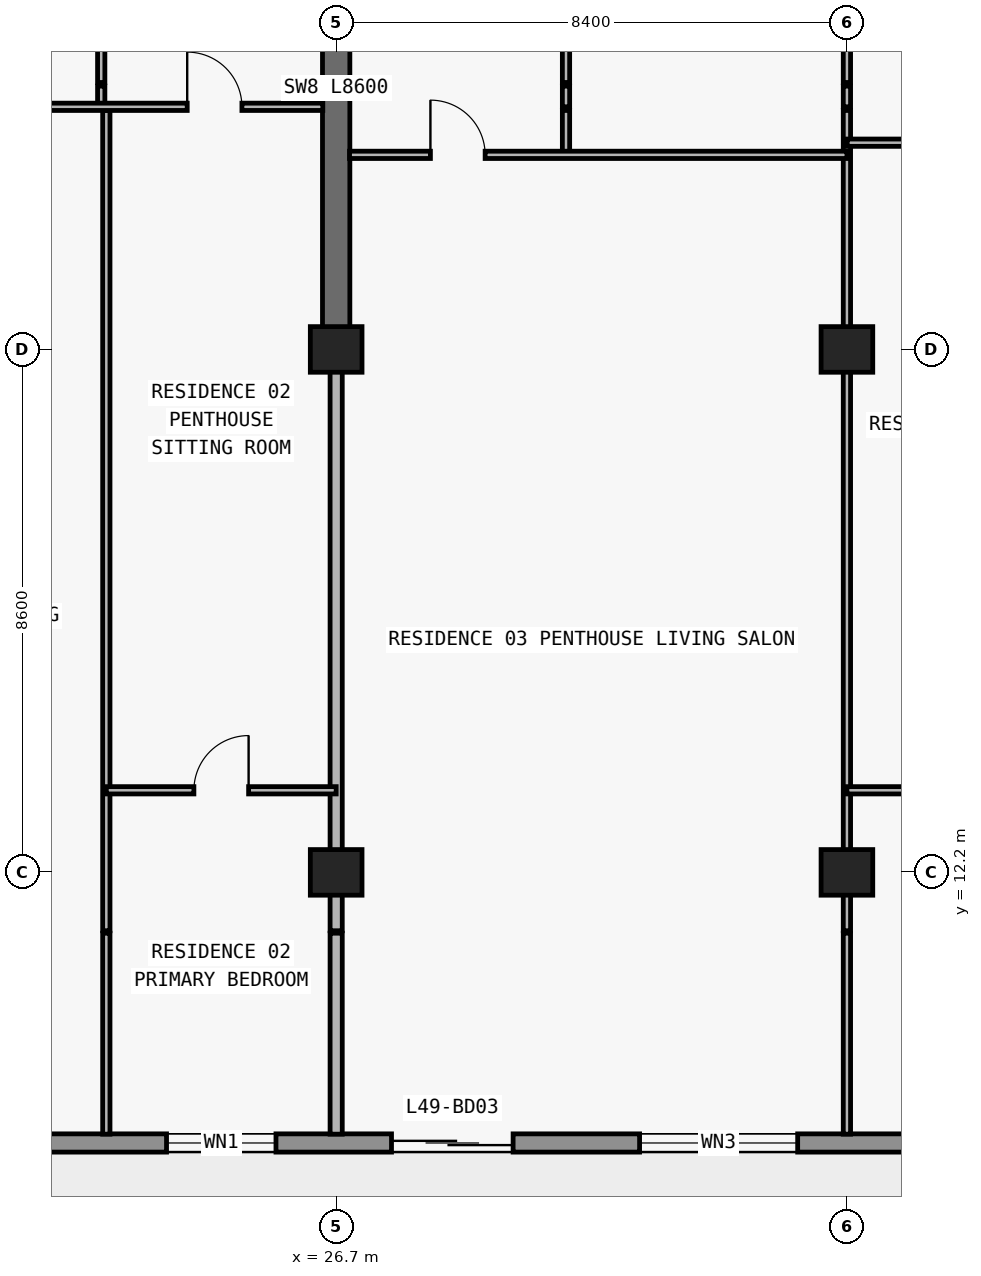
"""IFC4 building model, lengths in metres.
Left out: names, types, materials, properties, quantities, classifications, styles, units other than length and angle.
Written with IfcOpenShell. Run it as: python <this file> out.ifc"""

import sys

from ifc_helpers import new_model, si_unit, direction, frame, frame_2d, origin, origin_2d, place, context, subcontext, project, spatial, rectangle, extrude, element, fill, save


model = new_model("IFC4")
c1 = context("Model", 3, precision=1e-05, world=origin(), true_north=direction((0.0, 1.0)))
c2 = subcontext(c1, "Body", "Model", "MODEL_VIEW")
j1 = project(units=[si_unit("LENGTHUNIT", "METRE"), si_unit("PLANEANGLEUNIT", "RADIAN")], contexts=[c1])
p1 = place(None, origin())
s1 = spatial("IfcSite", under=j1, at=p1, CompositionType="ELEMENT")
p2 = place(p1, origin())
s2 = spatial("IfcBuilding", under=s1, at=p2, CompositionType="ELEMENT")
p3 = place(p2, frame((0.0, 0.0, 177.0)))
s3 = spatial("IfcBuildingStorey", under=s2, at=p3, CompositionType="ELEMENT", Elevation=177.0)
for number, where, z_axis, x_axis in (
    (1, (26.7, 12.2, 0.0), (0.0, 0.0, 1.0), (1.0, 0.0, 0.0)),
    (2, (35.1, 12.2, 0.0), (0.0, 0.0, 1.0), (1.0, 0.0, 0.0)),
    (3, (26.7, 20.8, 0.0), (0.0, 0.0, 1.0), (1.0, 0.0, 0.0)),
    (4, (35.1, 20.8, 0.0), (0.0, 0.0, 1.0), (1.0, 0.0, 0.0)),
):
    element("IfcColumn", number, at=place(p3, frame(where, z_axis=z_axis, x_axis=x_axis)), inside=s3, PredefinedType="COLUMN", context=c2, shape_type="SweptSolid", body=[
        extrude(rectangle(XDim=0.85, YDim=0.75, at=origin_2d()), origin(), (0.0, 0.0, 1.0), 3.05),
    ])
p4 = place(p3, frame((26.7, 20.8, 0.0), z_axis=(0.0, 0.0, 1.0), x_axis=(0.0, 1.0, 0.0)))
e5 = element("IfcWall", 5, at=p4, inside=s3, PredefinedType="SHEAR", context=c2, shape_type="SweptSolid", body=[
    extrude(rectangle(XDim=8.6, YDim=0.45, at=frame_2d((4.3, 0.0))), origin(), (0.0, 0.0, 1.0), 3.05),
])
p5 = place(p3, frame((67.7, 7.75, 0.0), z_axis=(0.0, 0.0, 1.0), x_axis=(-1.0, 0.0, 0.0)))
e6 = element("IfcWall", 6, at=p5, inside=s3, PredefinedType="STANDARD", context=c2, shape_type="SweptSolid", body=[
    extrude(rectangle(XDim=57.6, YDim=0.3, at=frame_2d((28.8, 0.0))), origin(), (0.0, 0.0, 1.0), 3.05),
])
p6 = place(p5, frame((54.673, 0.0, 0.0)))
e7 = element("IfcOpeningElement", 7, at=p6, cuts=e6, PredefinedType="OPENING", context=c2, shape_type="SweptSolid", body=[
    extrude(rectangle(XDim=2.0, YDim=2.3, at=frame_2d((1.0, 1.15))), frame((0.0, 0.16, 0.0), z_axis=(0.0, -1.0, 0.0), x_axis=(1.0, 0.0, 0.0)), (0.0, 0.0, 1.0), 0.32),
])
p7 = place(p5, frame((50.473, 0.0, 0.85)))
e8 = element("IfcOpeningElement", 8, at=p7, cuts=e6, PredefinedType="OPENING", context=c2, shape_type="SweptSolid", body=[
    extrude(rectangle(XDim=2.2, YDim=1.55, at=frame_2d((1.1, 0.775))), frame((0.0, 0.16, 0.0), z_axis=(0.0, -1.0, 0.0), x_axis=(1.0, 0.0, 0.0)), (0.0, 0.0, 1.0), 0.32),
])
p8 = place(p5, frame((46.09, 0.0, 0.0)))
e9 = element("IfcOpeningElement", 9, at=p8, cuts=e6, PredefinedType="OPENING", context=c2, shape_type="SweptSolid", body=[
    extrude(rectangle(XDim=2.0, YDim=2.3, at=frame_2d((1.0, 1.15))), frame((0.0, 0.16, 0.0), z_axis=(0.0, -1.0, 0.0), x_axis=(1.0, 0.0, 0.0)), (0.0, 0.0, 1.0), 0.32),
])
p9 = place(p5, frame((41.99, 0.0, 0.85)))
e10 = element("IfcOpeningElement", 10, at=p9, cuts=e6, PredefinedType="OPENING", context=c2, shape_type="SweptSolid", body=[
    extrude(rectangle(XDim=1.8, YDim=1.55, at=frame_2d((0.9, 0.775))), frame((0.0, 0.16, 0.0), z_axis=(0.0, -1.0, 0.0), x_axis=(1.0, 0.0, 0.0)), (0.0, 0.0, 1.0), 0.32),
])
p10 = place(p5, frame((38.09, 0.0, 0.0)))
e11 = element("IfcOpeningElement", 11, at=p10, cuts=e6, PredefinedType="OPENING", context=c2, shape_type="SweptSolid", body=[
    extrude(rectangle(XDim=2.0, YDim=2.3, at=frame_2d((1.0, 1.15))), frame((0.0, 0.16, 0.0), z_axis=(0.0, -1.0, 0.0), x_axis=(1.0, 0.0, 0.0)), (0.0, 0.0, 1.0), 0.32),
])
p11 = place(p5, frame((33.41, 0.0, 0.65)))
e12 = element("IfcOpeningElement", 12, at=p11, cuts=e6, PredefinedType="OPENING", context=c2, shape_type="SweptSolid", body=[
    extrude(rectangle(XDim=2.6, YDim=1.85, at=frame_2d((1.3, 0.925))), frame((0.0, 0.16, 0.0), z_axis=(0.0, -1.0, 0.0), x_axis=(1.0, 0.0, 0.0)), (0.0, 0.0, 1.0), 0.32),
])
p12 = place(p5, frame((27.7, 0.0, 0.85)))
e13 = element("IfcOpeningElement", 13, at=p12, cuts=e6, PredefinedType="OPENING", context=c2, shape_type="SweptSolid", body=[
    extrude(rectangle(XDim=2.2, YDim=1.55, at=frame_2d((1.1, 0.775))), frame((0.0, 0.16, 0.0), z_axis=(0.0, -1.0, 0.0), x_axis=(1.0, 0.0, 0.0)), (0.0, 0.0, 1.0), 0.32),
])
p13 = place(p5, frame((19.7, 0.0, 0.85)))
e14 = element("IfcOpeningElement", 14, at=p13, cuts=e6, PredefinedType="OPENING", context=c2, shape_type="SweptSolid", body=[
    extrude(rectangle(XDim=2.2, YDim=1.55, at=frame_2d((1.1, 0.775))), frame((0.0, 0.16, 0.0), z_axis=(0.0, -1.0, 0.0), x_axis=(1.0, 0.0, 0.0)), (0.0, 0.0, 1.0), 0.32),
])
p14 = place(p5, frame((13.29, 0.0, 0.0)))
e15 = element("IfcOpeningElement", 15, at=p14, cuts=e6, PredefinedType="OPENING", context=c2, shape_type="SweptSolid", body=[
    extrude(rectangle(XDim=2.0, YDim=2.3, at=frame_2d((1.0, 1.15))), frame((0.0, 0.16, 0.0), z_axis=(0.0, -1.0, 0.0), x_axis=(1.0, 0.0, 0.0)), (0.0, 0.0, 1.0), 0.32),
])
p15 = place(p5, frame((9.19, 0.0, 0.85)))
e16 = element("IfcOpeningElement", 16, at=p15, cuts=e6, PredefinedType="OPENING", context=c2, shape_type="SweptSolid", body=[
    extrude(rectangle(XDim=1.8, YDim=1.55, at=frame_2d((0.9, 0.775))), frame((0.0, 0.16, 0.0), z_axis=(0.0, -1.0, 0.0), x_axis=(1.0, 0.0, 0.0)), (0.0, 0.0, 1.0), 0.32),
])
p16 = place(p5, frame((5.273, 0.0, 0.0)))
e17 = element("IfcOpeningElement", 17, at=p16, cuts=e6, PredefinedType="OPENING", context=c2, shape_type="SweptSolid", body=[
    extrude(rectangle(XDim=2.0, YDim=2.3, at=frame_2d((1.0, 1.15))), frame((0.0, 0.16, 0.0), z_axis=(0.0, -1.0, 0.0), x_axis=(1.0, 0.0, 0.0)), (0.0, 0.0, 1.0), 0.32),
])
p17 = place(p5, frame((1.073, 0.0, 0.85)))
e18 = element("IfcOpeningElement", 18, at=p17, cuts=e6, PredefinedType="OPENING", context=c2, shape_type="SweptSolid", body=[
    extrude(rectangle(XDim=2.2, YDim=1.55, at=frame_2d((1.1, 0.775))), frame((0.0, 0.16, 0.0), z_axis=(0.0, -1.0, 0.0), x_axis=(1.0, 0.0, 0.0)), (0.0, 0.0, 1.0), 0.32),
])
p18 = place(p3, frame((22.836, 24.79, 0.0), z_axis=(0.0, 0.0, 1.0), x_axis=(0.0, 1.0, 0.0)))
e19 = element("IfcWall", 19, at=p18, inside=s3, PredefinedType="PARTITIONING", context=c2, shape_type="SweptSolid", body=[
    extrude(rectangle(XDim=0.34, YDim=0.12, at=frame_2d((0.17, 0.0))), origin(), (0.0, 0.0, 1.0), 3.05),
])
p19 = place(p3, frame((22.836, 25.19, 0.0), z_axis=(0.0, 0.0, 1.0), x_axis=(0.0, 1.0, 0.0)))
e20 = element("IfcWall", 20, at=p19, inside=s3, PredefinedType="PARTITIONING", context=c2, shape_type="SweptSolid", body=[
    extrude(rectangle(XDim=4.69, YDim=0.12, at=frame_2d((2.345, 0.0))), origin(), (0.0, 0.0, 1.0), 3.05),
])
p20 = place(p19, frame((1.895, 0.0, 0.0)))
e21 = element("IfcOpeningElement", 21, at=p20, cuts=e20, PredefinedType="OPENING", context=c2, shape_type="SweptSolid", body=[
    extrude(rectangle(XDim=0.9, YDim=2.15, at=frame_2d((0.45, 1.075))), frame((0.0, 0.07, 0.0), z_axis=(0.0, -1.0, 0.0), x_axis=(1.0, 0.0, 0.0)), (0.0, 0.0, 1.0), 0.14),
])
p21 = place(p3, frame((22.92, 7.895, 0.0), z_axis=(0.0, 0.0, 1.0), x_axis=(0.0, 1.0, 0.0)))
e22 = element("IfcWall", 22, at=p21, inside=s3, PredefinedType="PARTITIONING", context=c2, shape_type="SweptSolid", body=[
    extrude(rectangle(XDim=3.305, YDim=0.12, at=frame_2d((1.652, 0.0))), origin(), (0.0, 0.0, 1.0), 3.05),
])
p22 = place(p3, frame((22.92, 11.24, 0.0), z_axis=(0.0, 0.0, 1.0), x_axis=(0.0, 1.0, 0.0)))
e23 = element("IfcWall", 23, at=p22, inside=s3, PredefinedType="PARTITIONING", context=c2, shape_type="SweptSolid", body=[
    extrude(rectangle(XDim=13.49, YDim=0.12, at=frame_2d((6.745, 0.0))), origin(), (0.0, 0.0, 1.0), 3.05),
])
p23 = place(p3, frame((26.7, 7.895, 0.0), z_axis=(0.0, 0.0, 1.0), x_axis=(0.0, 1.0, 0.0)))
e24 = element("IfcWall", 24, at=p23, inside=s3, PredefinedType="PARTITIONING", context=c2, shape_type="SweptSolid", body=[
    extrude(rectangle(XDim=3.305, YDim=0.2, at=frame_2d((1.652, 0.0))), origin(), (0.0, 0.0, 1.0), 3.05),
])
p24 = place(p3, frame((26.7, 11.24, 0.0), z_axis=(0.0, 0.0, 1.0), x_axis=(0.0, 1.0, 0.0)))
e25 = element("IfcWall", 25, at=p24, inside=s3, PredefinedType="PARTITIONING", context=c2, shape_type="SweptSolid", body=[
    extrude(rectangle(XDim=9.555, YDim=0.2, at=frame_2d((4.777, 0.0))), origin(), (0.0, 0.0, 1.0), 2.263),
])
p25 = place(p3, frame((30.48, 24.0, 0.0), z_axis=(0.0, 0.0, 1.0), x_axis=(0.0, 1.0, 0.0)))
e26 = element("IfcWall", 26, at=p25, inside=s3, PredefinedType="PARTITIONING", context=c2, shape_type="SweptSolid", body=[
    extrude(rectangle(XDim=0.73, YDim=0.12, at=frame_2d((0.365, 0.0))), origin(), (0.0, 0.0, 1.0), 3.05),
])
p26 = place(p3, frame((30.48, 24.79, 0.0), z_axis=(0.0, 0.0, 1.0), x_axis=(0.0, 1.0, 0.0)))
e27 = element("IfcWall", 27, at=p26, inside=s3, PredefinedType="PARTITIONING", context=c2, shape_type="SweptSolid", body=[
    extrude(rectangle(XDim=0.34, YDim=0.12, at=frame_2d((0.17, 0.0))), origin(), (0.0, 0.0, 1.0), 3.05),
])
p27 = place(p3, frame((30.48, 25.19, 0.0), z_axis=(0.0, 0.0, 1.0), x_axis=(0.0, 1.0, 0.0)))
e28 = element("IfcWall", 28, at=p27, inside=s3, PredefinedType="PARTITIONING", context=c2, shape_type="SweptSolid", body=[
    extrude(rectangle(XDim=3.61, YDim=0.12, at=frame_2d((1.805, 0.0))), origin(), (0.0, 0.0, 1.0), 3.05),
])
p28 = place(p27, frame((1.355, 0.0, 0.0)))
e29 = element("IfcOpeningElement", 29, at=p28, cuts=e28, PredefinedType="OPENING", context=c2, shape_type="SweptSolid", body=[
    extrude(rectangle(XDim=0.9, YDim=2.15, at=frame_2d((0.45, 1.075))), frame((0.0, 0.07, 0.0), z_axis=(0.0, -1.0, 0.0), x_axis=(1.0, 0.0, 0.0)), (0.0, 0.0, 1.0), 0.14),
])
p29 = place(p3, frame((35.1, 7.895, 0.0), z_axis=(0.0, 0.0, 1.0), x_axis=(0.0, 1.0, 0.0)))
e30 = element("IfcWall", 30, at=p29, inside=s3, PredefinedType="PARTITIONING", context=c2, shape_type="SweptSolid", body=[
    extrude(rectangle(XDim=3.305, YDim=0.12, at=frame_2d((1.652, 0.0))), origin(), (0.0, 0.0, 1.0), 3.05),
])
p30 = place(p3, frame((35.1, 11.24, 0.0), z_axis=(0.0, 0.0, 1.0), x_axis=(0.0, 1.0, 0.0)))
e31 = element("IfcWall", 31, at=p30, inside=s3, PredefinedType="PARTITIONING", context=c2, shape_type="SweptSolid", body=[
    extrude(rectangle(XDim=13.49, YDim=0.12, at=frame_2d((6.745, 0.0))), origin(), (0.0, 0.0, 1.0), 2.263),
])
p31 = place(p3, frame((35.1, 24.79, 0.0), z_axis=(0.0, 0.0, 1.0), x_axis=(0.0, 1.0, 0.0)))
e32 = element("IfcWall", 32, at=p31, inside=s3, PredefinedType="PARTITIONING", context=c2, shape_type="SweptSolid", body=[
    extrude(rectangle(XDim=0.34, YDim=0.12, at=frame_2d((0.17, 0.0))), origin(), (0.0, 0.0, 1.0), 2.263),
])
p32 = place(p3, frame((35.1, 25.19, 0.0), z_axis=(0.0, 0.0, 1.0), x_axis=(0.0, 1.0, 0.0)))
e33 = element("IfcWall", 33, at=p32, inside=s3, PredefinedType="PARTITIONING", context=c2, shape_type="SweptSolid", body=[
    extrude(rectangle(XDim=4.69, YDim=0.12, at=frame_2d((2.345, 0.0))), origin(), (0.0, 0.0, 1.0), 2.263),
])
p33 = place(p32, frame((1.255, 0.0, 0.0)))
e34 = element("IfcOpeningElement", 34, at=p33, cuts=e33, PredefinedType="OPENING", context=c2, shape_type="SweptSolid", body=[
    extrude(rectangle(XDim=0.9, YDim=2.15, at=frame_2d((0.45, 1.075))), frame((0.0, 0.07, 0.0), z_axis=(0.0, -1.0, 0.0), x_axis=(1.0, 0.0, 0.0)), (0.0, 0.0, 1.0), 0.14),
])
p34 = place(p3, frame((22.92, 13.55, 0.0), z_axis=(0.0, 0.0, 1.0), x_axis=(1.0, 0.0, 0.0)))
e35 = element("IfcWall", 35, at=p34, inside=s3, PredefinedType="PARTITIONING", context=c2, shape_type="SweptSolid", body=[
    extrude(rectangle(XDim=3.78, YDim=0.12, at=frame_2d((1.89, 0.0))), origin(), (0.0, 0.0, 1.0), 3.05),
])
p35 = place(p34, frame((1.44, 0.0, 0.0)))
e36 = element("IfcOpeningElement", 36, at=p35, cuts=e35, PredefinedType="OPENING", context=c2, shape_type="SweptSolid", body=[
    extrude(rectangle(XDim=0.9, YDim=2.15, at=frame_2d((0.45, 1.075))), frame((0.0, 0.07, 0.0), z_axis=(0.0, -1.0, 0.0), x_axis=(1.0, 0.0, 0.0)), (0.0, 0.0, 1.0), 0.14),
])
p36 = place(p3, frame((35.1, 13.55, 0.0), z_axis=(0.0, 0.0, 1.0), x_axis=(1.0, 0.0, 0.0)))
e37 = element("IfcWall", 37, at=p36, inside=s3, PredefinedType="PARTITIONING", context=c2, shape_type="SweptSolid", body=[
    extrude(rectangle(XDim=16.0, YDim=0.12, at=frame_2d((8.0, 0.0))), origin(), (0.0, 0.0, 1.0), 3.05),
])
p37 = place(p36, frame((3.35, 0.0, 0.0)))
e38 = element("IfcOpeningElement", 38, at=p37, cuts=e37, PredefinedType="OPENING", context=c2, shape_type="SweptSolid", body=[
    extrude(rectangle(XDim=0.9, YDim=2.15, at=frame_2d((0.45, 1.075))), frame((0.0, 0.07, 0.0), z_axis=(0.0, -1.0, 0.0), x_axis=(1.0, 0.0, 0.0)), (0.0, 0.0, 1.0), 0.14),
])
p38 = place(p36, frame((11.35, 0.0, 0.0)))
e39 = element("IfcOpeningElement", 39, at=p38, cuts=e37, PredefinedType="OPENING", context=c2, shape_type="SweptSolid", body=[
    extrude(rectangle(XDim=0.9, YDim=2.15, at=frame_2d((0.45, 1.075))), frame((0.0, 0.07, 0.0), z_axis=(0.0, -1.0, 0.0), x_axis=(1.0, 0.0, 0.0)), (0.0, 0.0, 1.0), 0.14),
])
p39 = place(p3, frame((26.92, 24.0, 0.0), z_axis=(0.0, 0.0, 1.0), x_axis=(1.0, 0.0, 0.0)))
e40 = element("IfcWall", 40, at=p39, inside=s3, PredefinedType="PARTITIONING", context=c2, shape_type="SweptSolid", body=[
    extrude(rectangle(XDim=8.18, YDim=0.12, at=frame_2d((4.09, 0.0))), origin(), (0.0, 0.0, 1.0), 3.05),
])
p40 = place(p39, frame((1.33, 0.0, 0.0)))
e41 = element("IfcOpeningElement", 41, at=p40, cuts=e40, PredefinedType="OPENING", context=c2, shape_type="SweptSolid", body=[
    extrude(rectangle(XDim=0.9, YDim=2.15, at=frame_2d((0.45, 1.075))), frame((0.0, 0.07, 0.0), z_axis=(0.0, -1.0, 0.0), x_axis=(1.0, 0.0, 0.0)), (0.0, 0.0, 1.0), 0.14),
])
p41 = place(p3, frame((35.105, 24.2, 0.0), z_axis=(0.0, 0.0, 1.0), x_axis=(1.0, 0.0, 0.0)))
e42 = element("IfcWall", 42, at=p41, inside=s3, PredefinedType="PARTITIONING", context=c2, shape_type="SweptSolid", body=[
    extrude(rectangle(XDim=7.59, YDim=0.12, at=frame_2d((3.795, 0.0))), origin(), (0.0, 0.0, 1.0), 3.05),
])
p42 = place(p41, frame((3.345, 0.0, 0.0)))
e43 = element("IfcOpeningElement", 43, at=p42, cuts=e42, PredefinedType="OPENING", context=c2, shape_type="SweptSolid", body=[
    extrude(rectangle(XDim=0.9, YDim=2.15, at=frame_2d((0.45, 1.075))), frame((0.0, 0.07, 0.0), z_axis=(0.0, -1.0, 0.0), x_axis=(1.0, 0.0, 0.0)), (0.0, 0.0, 1.0), 0.14),
])
p43 = place(p3, frame((18.3, 24.79, 0.0), z_axis=(0.0, 0.0, 1.0), x_axis=(1.0, 0.0, 0.0)))
e44 = element("IfcWall", 44, at=p43, inside=s3, PredefinedType="PARTITIONING", context=c2, shape_type="SweptSolid", body=[
    extrude(rectangle(XDim=8.18, YDim=0.12, at=frame_2d((4.09, 0.0))), origin(), (0.0, 0.0, 1.0), 3.05),
])
p44 = place(p43, frame((1.818, 0.0, 0.0)))
e45 = element("IfcOpeningElement", 45, at=p44, cuts=e44, PredefinedType="OPENING", context=c2, shape_type="SweptSolid", body=[
    extrude(rectangle(XDim=0.9, YDim=2.15, at=frame_2d((0.45, 1.075))), frame((0.0, 0.07, 0.0), z_axis=(0.0, -1.0, 0.0), x_axis=(1.0, 0.0, 0.0)), (0.0, 0.0, 1.0), 0.14),
])
p45 = place(p43, frame((5.95, 0.0, 0.0)))
e46 = element("IfcOpeningElement", 46, at=p45, cuts=e44, PredefinedType="OPENING", context=c2, shape_type="SweptSolid", body=[
    extrude(rectangle(XDim=0.9, YDim=2.15, at=frame_2d((0.45, 1.075))), frame((0.0, 0.07, 0.0), z_axis=(0.0, -1.0, 0.0), x_axis=(1.0, 0.0, 0.0)), (0.0, 0.0, 1.0), 0.14),
])
p46 = place(p9, origin())
e47 = element("IfcWindow", 47, at=p46, inside=s3, PartitioningType="SINGLE_PANEL", PredefinedType="WINDOW", context=c2, shape_type="SweptSolid", body=[
    extrude(rectangle(XDim=1.8, YDim=1.55, at=frame_2d((0.9, 0.775))), frame((0.0, 0.03, 0.0), z_axis=(0.0, -1.0, 0.0), x_axis=(1.0, 0.0, 0.0)), (0.0, 0.0, 1.0), 0.06),
])
fill(e10, e47)
p47 = place(p10, origin())
e48 = element("IfcDoor", 48, at=p47, inside=s3, OperationType="DOUBLE_DOOR_SLIDING", PredefinedType="DOOR", context=c2, shape_type="SweptSolid", body=[
    extrude(rectangle(XDim=2.0, YDim=2.3, at=frame_2d((1.0, 1.15))), frame((0.0, 0.025, 0.0), z_axis=(0.0, -1.0, 0.0), x_axis=(1.0, 0.0, 0.0)), (0.0, 0.0, 1.0), 0.05),
])
fill(e11, e48)
p48 = place(p11, origin())
e49 = element("IfcWindow", 49, at=p48, inside=s3, PartitioningType="SINGLE_PANEL", PredefinedType="WINDOW", context=c2, shape_type="SweptSolid", body=[
    extrude(rectangle(XDim=2.6, YDim=1.85, at=frame_2d((1.3, 0.925))), frame((0.0, 0.03, 0.0), z_axis=(0.0, -1.0, 0.0), x_axis=(1.0, 0.0, 0.0)), (0.0, 0.0, 1.0), 0.06),
])
fill(e12, e49)
p49 = place(p45, origin())
e50 = element("IfcDoor", 50, at=p49, inside=s3, OperationType="SINGLE_SWING_LEFT", PredefinedType="DOOR", context=c2, shape_type="SweptSolid", body=[
    extrude(rectangle(XDim=0.9, YDim=2.15, at=frame_2d((0.45, 1.075))), frame((0.0, 0.025, 0.0), z_axis=(0.0, -1.0, 0.0), x_axis=(1.0, 0.0, 0.0)), (0.0, 0.0, 1.0), 0.05),
])
fill(e46, e50)
p50 = place(p35, origin())
e51 = element("IfcDoor", 51, at=p50, inside=s3, OperationType="SINGLE_SWING_RIGHT", PredefinedType="DOOR", context=c2, shape_type="SweptSolid", body=[
    extrude(rectangle(XDim=0.9, YDim=2.15, at=frame_2d((0.45, 1.075))), frame((0.0, 0.025, 0.0), z_axis=(0.0, -1.0, 0.0), x_axis=(1.0, 0.0, 0.0)), (0.0, 0.0, 1.0), 0.05),
])
fill(e36, e51)
p51 = place(p40, origin())
e52 = element("IfcDoor", 52, at=p51, inside=s3, OperationType="SINGLE_SWING_LEFT", PredefinedType="DOOR", context=c2, shape_type="SweptSolid", body=[
    extrude(rectangle(XDim=0.9, YDim=2.15, at=frame_2d((0.45, 1.075))), frame((0.0, 0.025, 0.0), z_axis=(0.0, -1.0, 0.0), x_axis=(1.0, 0.0, 0.0)), (0.0, 0.0, 1.0), 0.05),
])
fill(e41, e52)
save(model, sys.argv[1])
